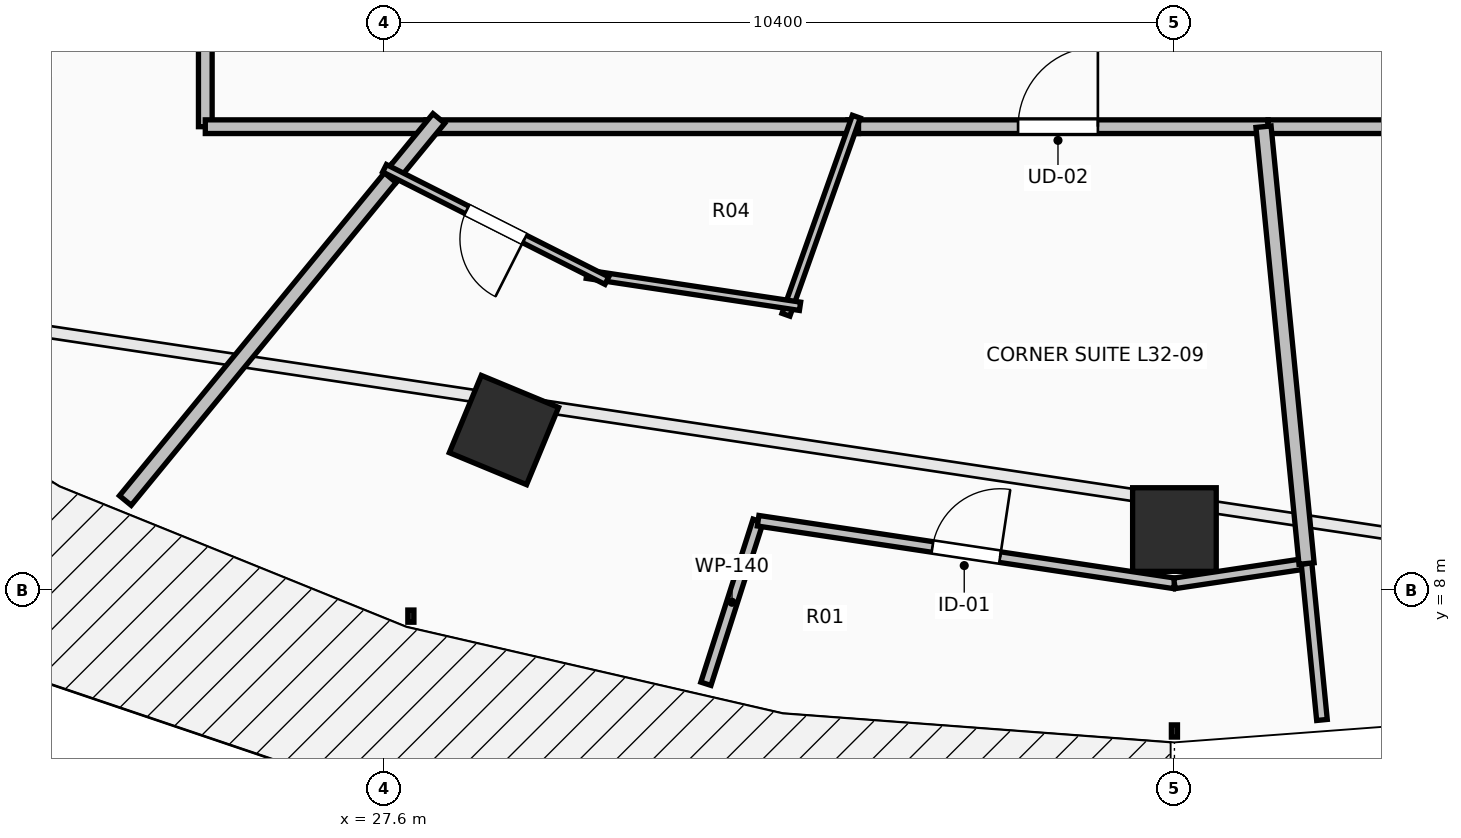
"""IFC4 building model, lengths in metres.
Left out: names, types, materials, properties, quantities, classifications, styles, units other than length and angle.
Written with IfcOpenShell. Run it as: python <this file> out.ifc"""

import sys

from ifc_helpers import new_model, si_unit, direction, frame, frame_2d, origin, origin_2d, place, context, subcontext, project, spatial, rectangle, extrude, element, fill, save


model = new_model("IFC4")
c1 = context("Model", 3, precision=1e-05, world=origin(), true_north=direction((0.0, 1.0)))
c2 = subcontext(c1, "Body", "Model", "MODEL_VIEW")
j1 = project(units=[si_unit("LENGTHUNIT", "METRE"), si_unit("PLANEANGLEUNIT", "RADIAN")], contexts=[c1])
p1 = place(None, origin())
s1 = spatial("IfcSite", under=j1, at=p1, CompositionType="ELEMENT")
p2 = place(p1, origin())
s2 = spatial("IfcBuilding", under=s1, at=p2, CompositionType="ELEMENT")
p3 = place(p2, frame((0.0, 0.0, 120.8)))
s3 = spatial("IfcBuildingStorey", under=s2, at=p3, CompositionType="ELEMENT", Elevation=120.8)
for number, where, z_axis, x_axis in (
    (1, (29.179, 10.109, 0.0), (0.0, 0.0, 1.0), (-0.383, -0.924, 0.0)),
    (2, (38.0, 8.8, 0.0), (0.0, 0.0, 1.0), (0.0, -1.0, 0.0)),
):
    element("IfcColumn", number, at=place(p3, frame(where, z_axis=z_axis, x_axis=x_axis)), inside=s3, PredefinedType="COLUMN", context=c2, shape_type="SweptSolid", body=[
        extrude(rectangle(XDim=1.1, YDim=1.1, at=origin_2d()), origin(), (0.0, 0.0, 1.0), 3.5),
    ])
p4 = place(p3, frame((25.25, 18.178, 0.0), z_axis=(0.0, 0.0, 1.0), x_axis=(0.0, -1.0, 0.0)))
e3 = element("IfcWall", 3, at=p4, inside=s3, PredefinedType="PARTITIONING", context=c2, shape_type="SweptSolid", body=[
    extrude(rectangle(XDim=4.078, YDim=0.18, at=frame_2d((2.039, 0.0))), origin(), (0.0, 0.0, 1.0), 2.342),
])
p5 = place(p4, frame((1.514, 0.0, 0.0)))
e4 = element("IfcOpeningElement", 4, at=p5, cuts=e3, PredefinedType="OPENING", context=c2, shape_type="SweptSolid", body=[
    extrude(rectangle(XDim=1.05, YDim=2.2, at=frame_2d((0.525, 1.1))), frame((0.0, 0.105, 0.0), z_axis=(0.0, -1.0, 0.0), x_axis=(1.0, 0.0, 0.0)), (0.0, 0.0, 1.0), 0.21),
])
p6 = place(p3, frame((25.25, 14.1, 0.0), z_axis=(0.0, 0.0, 1.0), x_axis=(1.0, 0.0, 0.0)))
e5 = element("IfcWall", 5, at=p6, inside=s3, PredefinedType="PARTITIONING", context=c2, shape_type="SweptSolid", body=[
    extrude(rectangle(XDim=3.044, YDim=0.18, at=frame_2d((1.522, 0.0))), origin(), (0.0, 0.0, 1.0), 2.342),
])
p7 = place(p3, frame((33.704, 14.1, 0.0), z_axis=(0.0, 0.0, 1.0), x_axis=(1.0, 0.0, 0.0)))
e6 = element("IfcWall", 6, at=p7, inside=s3, PredefinedType="PARTITIONING", context=c2, shape_type="SweptSolid", body=[
    extrude(rectangle(XDim=5.528, YDim=0.18, at=frame_2d((2.764, 0.0))), origin(), (0.0, 0.0, 1.0), 2.784),
])
p8 = place(p7, frame((2.239, 0.0, 0.0)))
e7 = element("IfcOpeningElement", 7, at=p8, cuts=e6, PredefinedType="OPENING", context=c2, shape_type="SweptSolid", body=[
    extrude(rectangle(XDim=1.05, YDim=2.2, at=frame_2d((0.525, 1.1))), frame((0.0, 0.105, 0.0), z_axis=(0.0, -1.0, 0.0), x_axis=(1.0, 0.0, 0.0)), (0.0, 0.0, 1.0), 0.21),
])
p9 = place(p3, frame((28.154, 14.1, 0.0), z_axis=(0.0, 0.0, 1.0), x_axis=(1.0, 0.0, 0.0)))
e8 = element("IfcWall", 8, at=p9, inside=s3, PredefinedType="PARTITIONING", context=c2, shape_type="SweptSolid", body=[
    extrude(rectangle(XDim=5.69, YDim=0.18, at=frame_2d((2.845, 0.0))), origin(), (0.0, 0.0, 1.0), 2.342),
])
p10 = place(p3, frame((39.232, 14.1, 0.0), z_axis=(0.0, 0.0, 1.0), x_axis=(1.0, 0.0, 0.0)))
e9 = element("IfcWall", 9, at=p10, inside=s3, PredefinedType="PARTITIONING", context=c2, shape_type="SweptSolid", body=[
    extrude(rectangle(XDim=2.968, YDim=0.18, at=frame_2d((1.484, 0.0))), origin(), (0.0, 0.0, 1.0), 2.784),
])
p11 = place(p3, frame((24.198, 9.182, 0.0), z_axis=(0.0, 0.0, 1.0), x_axis=(0.634365086516, 0.773033593713, 0.0)))
e10 = element("IfcWall", 10, at=p11, inside=s3, PredefinedType="PARTITIONING", context=c2, shape_type="SweptSolid", body=[
    extrude(rectangle(XDim=5.634, YDim=0.2, at=frame_2d((2.817, 0.0))), origin(), (0.0, 0.0, 1.0), 2.587),
])
p12 = place(p3, frame((27.683, 13.429, 0.0), z_axis=(0.0, 0.0, 1.0), x_axis=(0.634186727441, 0.77317992391, 0.0)))
e11 = element("IfcWall", 11, at=p12, inside=s3, PredefinedType="PARTITIONING", context=c2, shape_type="SweptSolid", body=[
    extrude(rectangle(XDim=1.008, YDim=0.2, at=frame_2d((0.504, 0.0))), origin(), (0.0, 0.0, 1.0), 2.342),
])
p13 = place(p3, frame((33.815, 14.232, 0.0), z_axis=(0.0, 0.0, 1.0), x_axis=(-0.334786713612, -0.942293933117, 0.0)))
e12 = element("IfcWall", 12, at=p13, inside=s3, PredefinedType="PARTITIONING", context=c2, shape_type="SweptSolid", body=[
    extrude(rectangle(XDim=2.765, YDim=0.11, at=frame_2d((1.383, 0.0))), origin(), (0.0, 0.0, 1.0), 2.784),
])
p14 = place(p3, frame((33.074, 11.737, 0.0), z_axis=(0.0, 0.0, 1.0), x_axis=(-0.988902866222, 0.148563525729, 0.0)))
e13 = element("IfcWall", 13, at=p14, inside=s3, PredefinedType="PARTITIONING", context=c2, shape_type="SweptSolid", body=[
    extrude(rectangle(XDim=2.836, YDim=0.11, at=frame_2d((1.418, 0.0))), origin(), (0.0, 0.0, 1.0), 3.15),
])
p15 = place(p3, frame((30.533, 12.075, 0.0), z_axis=(0.0, 0.0, 1.0), x_axis=(-0.892451870397, 0.451142614952, 0.0)))
e14 = element("IfcWall", 14, at=p15, inside=s3, PredefinedType="PARTITIONING", context=c2, shape_type="SweptSolid", body=[
    extrude(rectangle(XDim=3.277, YDim=0.11, at=frame_2d((1.639, 0.0))), origin(), (0.0, 0.0, 1.0), 2.342),
])
p16 = place(p15, frame((1.214, 0.0, 0.0)))
e15 = element("IfcOpeningElement", 15, at=p16, cuts=e14, PredefinedType="OPENING", context=c2, shape_type="SweptSolid", body=[
    extrude(rectangle(XDim=0.85, YDim=2.1, at=frame_2d((0.425, 1.05))), frame((0.0, 0.07, 0.0), z_axis=(0.0, -1.0, 0.0), x_axis=(1.0, 0.0, 0.0)), (0.0, 0.0, 1.0), 0.14),
])
p17 = place(p3, frame((31.836, 6.771, 0.0), z_axis=(0.0, 0.0, 1.0), x_axis=(0.305019563363, 0.952346085184, 0.0)))
e16 = element("IfcWall", 16, at=p17, inside=s3, PredefinedType="PARTITIONING", context=c2, shape_type="SweptSolid", body=[
    extrude(rectangle(XDim=2.252, YDim=0.14, at=frame_2d((1.126, 0.0))), origin(), (0.0, 0.0, 1.0), 3.15),
])
p18 = place(p3, frame((32.523, 8.916, 0.0), z_axis=(0.0, 0.0, 1.0), x_axis=(0.988872243588, -0.148767220385, 0.0)))
e17 = element("IfcWall", 17, at=p18, inside=s3, PredefinedType="PARTITIONING", context=c2, shape_type="SweptSolid", body=[
    extrude(rectangle(XDim=5.539, YDim=0.14, at=frame_2d((2.769, 0.0))), origin(), (0.0, 0.0, 1.0), 3.15),
])
p19 = place(p18, frame((2.319, 0.0, 0.0)))
e18 = element("IfcOpeningElement", 18, at=p19, cuts=e17, PredefinedType="OPENING", context=c2, shape_type="SweptSolid", body=[
    extrude(rectangle(XDim=0.9, YDim=2.1, at=frame_2d((0.45, 1.05))), frame((0.0, 0.085, 0.0), z_axis=(0.0, -1.0, 0.0), x_axis=(1.0, 0.0, 0.0)), (0.0, 0.0, 1.0), 0.17),
])
p20 = place(p3, frame((38.0, 8.092, 0.0), z_axis=(0.0, 0.0, 1.0), x_axis=(0.988912905534, 0.148496684368, 0.0)))
e19 = element("IfcWall", 19, at=p20, inside=s3, PredefinedType="PARTITIONING", context=c2, shape_type="SweptSolid", body=[
    extrude(rectangle(XDim=1.758, YDim=0.14, at=frame_2d((0.879, 0.0))), origin(), (0.0, 0.0, 1.0), 3.15),
])
p21 = place(p3, frame((39.738, 8.353, 0.0), z_axis=(0.0, 0.0, 1.0), x_axis=(0.098101024823, -0.995176461201, 0.0)))
e20 = element("IfcWall", 20, at=p21, inside=s3, PredefinedType="PARTITIONING", context=c2, shape_type="SweptSolid", body=[
    extrude(rectangle(XDim=2.068, YDim=0.14, at=frame_2d((1.034, 0.0))), origin(), (0.0, 0.0, 1.0), 3.15),
])
p22 = place(p3, frame((39.738, 8.353, 0.0), z_axis=(0.0, 0.0, 1.0), x_axis=(-0.098038593066, 0.995182613529, 0.0)))
e21 = element("IfcWall", 21, at=p22, inside=s3, PredefinedType="PARTITIONING", context=c2, shape_type="SweptSolid", body=[
    extrude(rectangle(XDim=5.775, YDim=0.2, at=frame_2d((2.887, 0.0))), origin(), (0.0, 0.0, 1.0), 2.342),
])
p23 = place(p8, origin())
e22 = element("IfcDoor", 22, at=p23, inside=s3, OperationType="SINGLE_SWING_RIGHT", PredefinedType="DOOR", context=c2, shape_type="SweptSolid", body=[
    extrude(rectangle(XDim=1.05, YDim=2.2, at=frame_2d((0.525, 1.1))), frame((0.0, 0.025, 0.0), z_axis=(0.0, -1.0, 0.0), x_axis=(1.0, 0.0, 0.0)), (0.0, 0.0, 1.0), 0.05),
])
fill(e7, e22)
p24 = place(p16, origin())
e23 = element("IfcDoor", 23, at=p24, inside=s3, OperationType="SINGLE_SWING_LEFT", PredefinedType="DOOR", context=c2, shape_type="SweptSolid", body=[
    extrude(rectangle(XDim=0.85, YDim=2.1, at=frame_2d((0.425, 1.05))), frame((0.0, 0.025, 0.0), z_axis=(0.0, -1.0, 0.0), x_axis=(1.0, 0.0, 0.0)), (0.0, 0.0, 1.0), 0.05),
])
fill(e15, e23)
p25 = place(p19, origin())
e24 = element("IfcDoor", 24, at=p25, inside=s3, OperationType="SINGLE_SWING_RIGHT", PredefinedType="DOOR", context=c2, shape_type="SweptSolid", body=[
    extrude(rectangle(XDim=0.9, YDim=2.1, at=frame_2d((0.45, 1.05))), frame((0.0, 0.025, 0.0), z_axis=(0.0, -1.0, 0.0), x_axis=(1.0, 0.0, 0.0)), (0.0, 0.0, 1.0), 0.05),
])
fill(e18, e24)
save(model, sys.argv[1])
